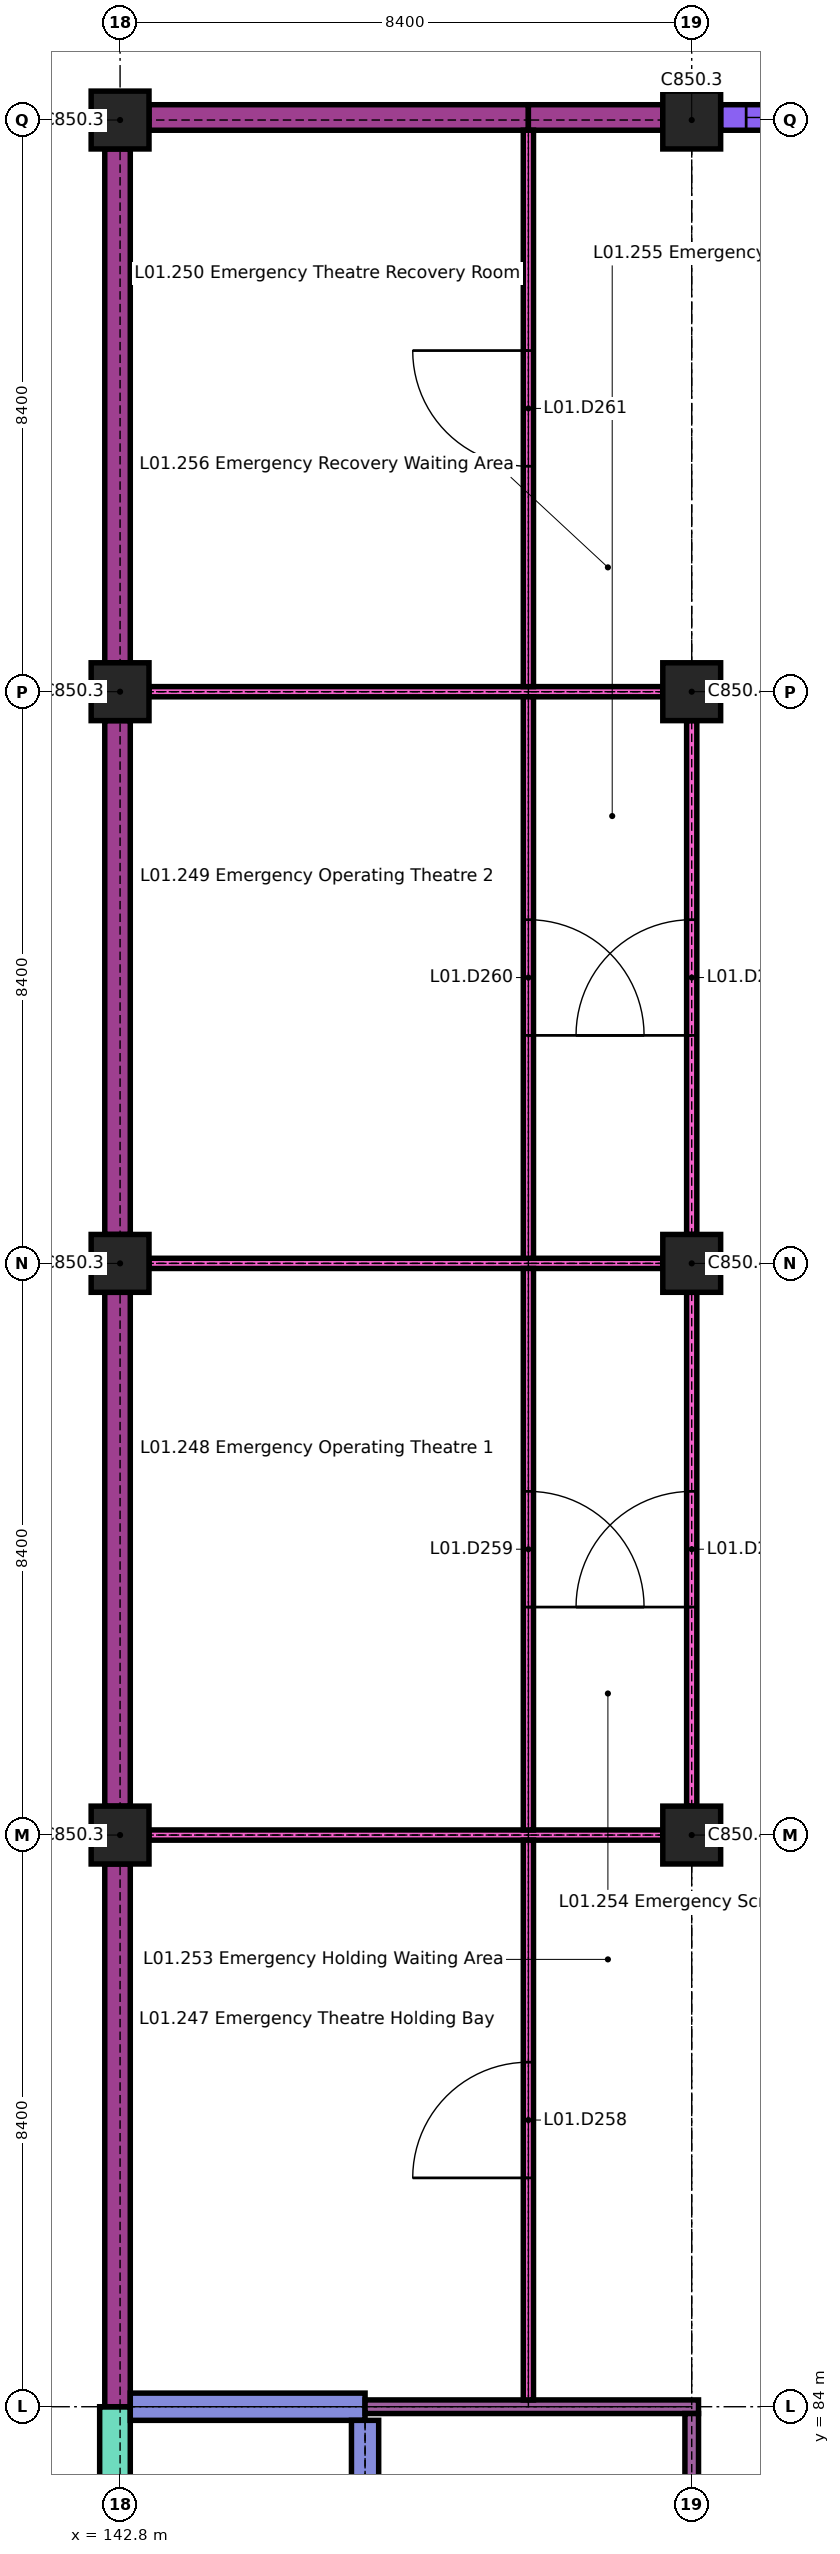
"""IFC4 building model, lengths in metres.
Left out: names, types, materials, properties, quantities, classifications, styles, units other than length and angle.
Written with IfcOpenShell. Run it as: python <this file> out.ifc"""

import sys

from ifc_helpers import new_model, si_unit, direction, frame, frame_2d, origin, origin_2d, place, context, subcontext, project, spatial, rectangle, extrude, element, fill, save


model = new_model("IFC4")
c1 = context("Model", 3, precision=1e-05, world=origin(), true_north=direction((0.0, 1.0)))
c2 = subcontext(c1, "Body", "Model", "MODEL_VIEW")
j1 = project(units=[si_unit("LENGTHUNIT", "METRE"), si_unit("PLANEANGLEUNIT", "RADIAN")], contexts=[c1])
p1 = place(None, origin())
s1 = spatial("IfcSite", under=j1, at=p1, CompositionType="ELEMENT")
p2 = place(p1, origin())
s2 = spatial("IfcBuilding", under=s1, at=p2, CompositionType="ELEMENT")
p3 = place(p2, frame((0.0, 0.0, 4.5)))
s3 = spatial("IfcBuildingStorey", under=s2, at=p3, CompositionType="ELEMENT", Elevation=4.5)
for number, where, z_axis, x_axis in (
    (1, (142.8, 92.4, 0.0), (0.0, 0.0, 1.0), (1.0, 0.0, 0.0)),
    (2, (151.2, 92.4, 0.0), (0.0, 0.0, 1.0), (1.0, 0.0, 0.0)),
    (3, (142.8, 100.8, 0.0), (0.0, 0.0, 1.0), (1.0, 0.0, 0.0)),
    (4, (151.2, 100.8, 0.0), (0.0, 0.0, 1.0), (1.0, 0.0, 0.0)),
    (5, (142.8, 109.2, 0.0), (0.0, 0.0, 1.0), (1.0, 0.0, 0.0)),
    (6, (151.2, 109.2, 0.0), (0.0, 0.0, 1.0), (1.0, 0.0, 0.0)),
    (7, (142.8, 117.6, 0.0), (0.0, 0.0, 1.0), (1.0, 0.0, 0.0)),
    (8, (151.2, 117.6, 0.0), (0.0, 0.0, 1.0), (1.0, 0.0, 0.0)),
):
    element("IfcColumn", number, at=place(p3, frame(where, z_axis=z_axis, x_axis=x_axis)), inside=s3, PredefinedType="COLUMN", context=c2, shape_type="SweptSolid", body=[
        extrude(rectangle(XDim=0.85, YDim=0.85, at=origin_2d()), origin(), (0.0, 0.0, 1.0), 3.45),
    ])
p4 = place(p3, frame((143.225, 117.637, 0.0), z_axis=(0.0, 0.0, 1.0), x_axis=(1.0, 0.0, 0.0)))
e9 = element("IfcWall", 9, at=p4, inside=s3, PredefinedType="SOLIDWALL", context=c2, shape_type="SweptSolid", body=[
    extrude(rectangle(XDim=5.575, YDim=0.375, at=frame_2d((2.788, 0.0))), origin(), (0.0, 0.0, 1.0), 3.15),
])
p5 = place(p3, frame((148.8, 117.637, 0.0), z_axis=(0.0, 0.0, 1.0), x_axis=(1.0, 0.0, 0.0)))
e10 = element("IfcWall", 10, at=p5, inside=s3, PredefinedType="SOLIDWALL", context=c2, shape_type="SweptSolid", body=[
    extrude(rectangle(XDim=1.975, YDim=0.375, at=frame_2d((0.987, 0.0))), origin(), (0.0, 0.0, 1.0), 3.15),
])
p6 = place(p3, frame((151.625, 117.637, 0.0), z_axis=(0.0, 0.0, 1.0), x_axis=(1.0, 0.0, 0.0)))
e11 = element("IfcWall", 11, at=p6, inside=s3, PredefinedType="SOLIDWALL", context=c2, shape_type="SweptSolid", body=[
    extrude(rectangle(XDim=2.175, YDim=0.375, at=frame_2d((1.087, 0.0))), origin(), (0.0, 0.0, 1.0), 3.6),
])
p7 = place(p6, frame((0.375, 0.0, 0.9)))
e12 = element("IfcOpeningElement", 12, at=p7, cuts=e11, PredefinedType="OPENING", context=c2, shape_type="SweptSolid", body=[
    extrude(rectangle(XDim=1.2, YDim=1.5, at=frame_2d((0.6, 0.75))), frame((0.0, 0.198, 0.0), z_axis=(0.0, -1.0, 0.0), x_axis=(1.0, 0.0, 0.0)), (0.0, 0.0, 1.0), 0.395),
])
p8 = place(p3, frame((142.725, 79.8, 0.0), z_axis=(0.0, 0.0, 1.0), x_axis=(0.0, 1.0, 0.0)))
e13 = element("IfcWall", 13, at=p8, inside=s3, PredefinedType="SOLIDWALL", context=c2, shape_type="SweptSolid", body=[
    extrude(rectangle(XDim=4.2, YDim=0.45, at=frame_2d((2.1, 0.0))), origin(), (0.0, 0.0, 1.0), 3.45),
])
p9 = place(p3, frame((142.762, 84.0, 0.0), z_axis=(0.0, 0.0, 1.0), x_axis=(0.0, 1.0, 0.0)))
e14 = element("IfcWall", 14, at=p9, inside=s3, PredefinedType="SOLIDWALL", context=c2, shape_type="SweptSolid", body=[
    extrude(rectangle(XDim=7.975, YDim=0.375, at=frame_2d((3.988, 0.0))), origin(), (0.0, 0.0, 1.0), 3.15),
])
p10 = place(p3, frame((142.762, 92.825, 0.0), z_axis=(0.0, 0.0, 1.0), x_axis=(0.0, 1.0, 0.0)))
e15 = element("IfcWall", 15, at=p10, inside=s3, PredefinedType="SOLIDWALL", context=c2, shape_type="SweptSolid", body=[
    extrude(rectangle(XDim=7.55, YDim=0.375, at=frame_2d((3.775, 0.0))), origin(), (0.0, 0.0, 1.0), 3.15),
])
p11 = place(p3, frame((142.762, 101.225, 0.0), z_axis=(0.0, 0.0, 1.0), x_axis=(0.0, 1.0, 0.0)))
e16 = element("IfcWall", 16, at=p11, inside=s3, PredefinedType="SOLIDWALL", context=c2, shape_type="SweptSolid", body=[
    extrude(rectangle(XDim=7.55, YDim=0.375, at=frame_2d((3.775, 0.0))), origin(), (0.0, 0.0, 1.0), 3.15),
])
p12 = place(p3, frame((142.762, 109.625, 0.0), z_axis=(0.0, 0.0, 1.0), x_axis=(0.0, 1.0, 0.0)))
e17 = element("IfcWall", 17, at=p12, inside=s3, PredefinedType="SOLIDWALL", context=c2, shape_type="SweptSolid", body=[
    extrude(rectangle(XDim=7.55, YDim=0.375, at=frame_2d((3.775, 0.0))), origin(), (0.0, 0.0, 1.0), 3.15),
])
p13 = place(p3, frame((142.95, 84.0, 0.0), z_axis=(0.0, 0.0, 1.0), x_axis=(1.0, 0.0, 0.0)))
e18 = element("IfcWall", 18, at=p13, inside=s3, PredefinedType="SHEAR", context=c2, shape_type="SweptSolid", body=[
    extrude(rectangle(XDim=3.45, YDim=0.4, at=frame_2d((1.725, 0.0))), origin(), (0.0, 0.0, 1.0), 3.45),
])
p14 = place(p3, frame((146.4, 84.0, 0.0), z_axis=(0.0, 0.0, 1.0), x_axis=(1.0, 0.0, 0.0)))
e19 = element("IfcWall", 19, at=p14, inside=s3, PredefinedType="PARTITIONING", context=c2, shape_type="SweptSolid", body=[
    extrude(rectangle(XDim=4.9, YDim=0.2, at=frame_2d((2.45, 0.0))), origin(), (0.0, 0.0, 1.0), 3.45),
])
for number, where, z_axis, x_axis in (
    (20, (143.225, 92.4, 0.0), (0.0, 0.0, 1.0), (1.0, 0.0, 0.0)),
    (21, (143.225, 100.8, 0.0), (0.0, 0.0, 1.0), (1.0, 0.0, 0.0)),
    (22, (143.225, 109.2, 0.0), (0.0, 0.0, 1.0), (1.0, 0.0, 0.0)),
):
    element("IfcWall", number, at=place(p3, frame(where, z_axis=z_axis, x_axis=x_axis)), inside=s3, PredefinedType="PARTITIONING", context=c2, shape_type="SweptSolid", body=[
        extrude(rectangle(XDim=7.55, YDim=0.15, at=frame_2d((3.775, 0.0))), origin(), (0.0, 0.0, 1.0), 3.6),
    ])
p15 = place(p3, frame((146.4, 75.8, 0.0), z_axis=(0.0, 0.0, 1.0), x_axis=(0.0, 1.0, 0.0)))
e23 = element("IfcWall", 23, at=p15, inside=s3, PredefinedType="SHEAR", context=c2, shape_type="SweptSolid", body=[
    extrude(rectangle(XDim=8.0, YDim=0.4, at=frame_2d((4.0, 0.0))), origin(), (0.0, 0.0, 1.0), 3.45),
])
p16 = place(p15, frame((1.3, 0.0, 0.0)))
e24 = element("IfcOpeningElement", 24, at=p16, cuts=e23, PredefinedType="OPENING", context=c2, shape_type="SweptSolid", body=[
    extrude(rectangle(XDim=1.4, YDim=2.1, at=frame_2d((0.7, 1.05))), frame((0.0, 0.21, 0.0), z_axis=(0.0, -1.0, 0.0), x_axis=(1.0, 0.0, 0.0)), (0.0, 0.0, 1.0), 0.42),
])
p17 = place(p15, frame((5.45, 0.0, 0.0)))
e25 = element("IfcOpeningElement", 25, at=p17, cuts=e23, PredefinedType="OPENING", context=c2, shape_type="SweptSolid", body=[
    extrude(rectangle(XDim=1.1, YDim=2.1, at=frame_2d((0.55, 1.05))), frame((0.0, 0.21, 0.0), z_axis=(0.0, -1.0, 0.0), x_axis=(1.0, 0.0, 0.0)), (0.0, 0.0, 1.0), 0.42),
])
p18 = place(p3, frame((148.8, 84.1, 0.0), z_axis=(0.0, 0.0, 1.0), x_axis=(0.0, 1.0, 0.0)))
e26 = element("IfcWall", 26, at=p18, inside=s3, PredefinedType="PARTITIONING", context=c2, shape_type="SweptSolid", body=[
    extrude(rectangle(XDim=8.225, YDim=0.15, at=frame_2d((4.112, 0.0))), origin(), (0.0, 0.0, 1.0), 3.6),
])
p19 = place(p18, frame((3.262, 0.0, 0.0)))
e27 = element("IfcOpeningElement", 27, at=p19, cuts=e26, PredefinedType="OPENING", context=c2, shape_type="SweptSolid", body=[
    extrude(rectangle(XDim=1.7, YDim=2.4, at=frame_2d((0.85, 1.2))), frame((0.0, 0.085, 0.0), z_axis=(0.0, -1.0, 0.0), x_axis=(1.0, 0.0, 0.0)), (0.0, 0.0, 1.0), 0.17),
])
p20 = place(p3, frame((148.8, 92.475, 0.0), z_axis=(0.0, 0.0, 1.0), x_axis=(0.0, 1.0, 0.0)))
e28 = element("IfcWall", 28, at=p20, inside=s3, PredefinedType="PARTITIONING", context=c2, shape_type="SweptSolid", body=[
    extrude(rectangle(XDim=8.25, YDim=0.15, at=frame_2d((4.125, 0.0))), origin(), (0.0, 0.0, 1.0), 3.6),
])
p21 = place(p20, frame((3.275, 0.0, 0.0)))
e29 = element("IfcOpeningElement", 29, at=p21, cuts=e28, PredefinedType="OPENING", context=c2, shape_type="SweptSolid", body=[
    extrude(rectangle(XDim=1.7, YDim=2.4, at=frame_2d((0.85, 1.2))), frame((0.0, 0.085, 0.0), z_axis=(0.0, -1.0, 0.0), x_axis=(1.0, 0.0, 0.0)), (0.0, 0.0, 1.0), 0.17),
])
p22 = place(p3, frame((148.8, 100.875, 0.0), z_axis=(0.0, 0.0, 1.0), x_axis=(0.0, 1.0, 0.0)))
e30 = element("IfcWall", 30, at=p22, inside=s3, PredefinedType="PARTITIONING", context=c2, shape_type="SweptSolid", body=[
    extrude(rectangle(XDim=8.25, YDim=0.15, at=frame_2d((4.125, 0.0))), origin(), (0.0, 0.0, 1.0), 3.6),
])
p23 = place(p22, frame((3.275, 0.0, 0.0)))
e31 = element("IfcOpeningElement", 31, at=p23, cuts=e30, PredefinedType="OPENING", context=c2, shape_type="SweptSolid", body=[
    extrude(rectangle(XDim=1.7, YDim=2.4, at=frame_2d((0.85, 1.2))), frame((0.0, 0.085, 0.0), z_axis=(0.0, -1.0, 0.0), x_axis=(1.0, 0.0, 0.0)), (0.0, 0.0, 1.0), 0.17),
])
p24 = place(p3, frame((148.8, 109.275, 0.0), z_axis=(0.0, 0.0, 1.0), x_axis=(0.0, 1.0, 0.0)))
e32 = element("IfcWall", 32, at=p24, inside=s3, PredefinedType="PARTITIONING", context=c2, shape_type="SweptSolid", body=[
    extrude(rectangle(XDim=8.175, YDim=0.15, at=frame_2d((4.087, 0.0))), origin(), (0.0, 0.0, 1.0), 3.6),
])
p25 = place(p24, frame((3.238, 0.0, 0.0)))
e33 = element("IfcOpeningElement", 33, at=p25, cuts=e32, PredefinedType="OPENING", context=c2, shape_type="SweptSolid", body=[
    extrude(rectangle(XDim=1.7, YDim=2.4, at=frame_2d((0.85, 1.2))), frame((0.0, 0.085, 0.0), z_axis=(0.0, -1.0, 0.0), x_axis=(1.0, 0.0, 0.0)), (0.0, 0.0, 1.0), 0.17),
])
p26 = place(p3, frame((151.2, 75.7, 0.0), z_axis=(0.0, 0.0, 1.0), x_axis=(0.0, 1.0, 0.0)))
e34 = element("IfcWall", 34, at=p26, inside=s3, PredefinedType="PARTITIONING", context=c2, shape_type="SweptSolid", body=[
    extrude(rectangle(XDim=8.2, YDim=0.2, at=frame_2d((4.1, 0.0))), origin(), (0.0, 0.0, 1.0), 3.45),
])
p27 = place(p26, frame((3.2, 0.0, 0.0)))
e35 = element("IfcOpeningElement", 35, at=p27, cuts=e34, PredefinedType="OPENING", context=c2, shape_type="SweptSolid", body=[
    extrude(rectangle(XDim=1.8, YDim=2.4, at=frame_2d((0.9, 1.2))), frame((0.0, 0.11, 0.0), z_axis=(0.0, -1.0, 0.0), x_axis=(1.0, 0.0, 0.0)), (0.0, 0.0, 1.0), 0.22),
])
p28 = place(p3, frame((151.2, 92.825, 0.0), z_axis=(0.0, 0.0, 1.0), x_axis=(0.0, 1.0, 0.0)))
e36 = element("IfcWall", 36, at=p28, inside=s3, PredefinedType="PARTITIONING", context=c2, shape_type="SweptSolid", body=[
    extrude(rectangle(XDim=7.55, YDim=0.15, at=frame_2d((3.775, 0.0))), origin(), (0.0, 0.0, 1.0), 3.6),
])
p29 = place(p28, frame((2.925, 0.0, 0.0)))
e37 = element("IfcOpeningElement", 37, at=p29, cuts=e36, PredefinedType="OPENING", context=c2, shape_type="SweptSolid", body=[
    extrude(rectangle(XDim=1.7, YDim=2.4, at=frame_2d((0.85, 1.2))), frame((0.0, 0.085, 0.0), z_axis=(0.0, -1.0, 0.0), x_axis=(1.0, 0.0, 0.0)), (0.0, 0.0, 1.0), 0.17),
])
p30 = place(p3, frame((151.2, 101.225, 0.0), z_axis=(0.0, 0.0, 1.0), x_axis=(0.0, 1.0, 0.0)))
e38 = element("IfcWall", 38, at=p30, inside=s3, PredefinedType="PARTITIONING", context=c2, shape_type="SweptSolid", body=[
    extrude(rectangle(XDim=7.55, YDim=0.15, at=frame_2d((3.775, 0.0))), origin(), (0.0, 0.0, 1.0), 3.6),
])
p31 = place(p30, frame((2.925, 0.0, 0.0)))
e39 = element("IfcOpeningElement", 39, at=p31, cuts=e38, PredefinedType="OPENING", context=c2, shape_type="SweptSolid", body=[
    extrude(rectangle(XDim=1.7, YDim=2.4, at=frame_2d((0.85, 1.2))), frame((0.0, 0.085, 0.0), z_axis=(0.0, -1.0, 0.0), x_axis=(1.0, 0.0, 0.0)), (0.0, 0.0, 1.0), 0.17),
])
p32 = place(p7, origin())
e40 = element("IfcWindow", 40, at=p32, inside=s3, PartitioningType="SINGLE_PANEL", PredefinedType="WINDOW", context=c2, shape_type="SweptSolid", body=[
    extrude(rectangle(XDim=1.2, YDim=1.5, at=frame_2d((0.6, 0.75))), frame((0.0, 0.03, 0.0), z_axis=(0.0, -1.0, 0.0), x_axis=(1.0, 0.0, 0.0)), (0.0, 0.0, 1.0), 0.06),
])
fill(e12, e40)
p33 = place(p19, origin())
e41 = element("IfcDoor", 41, at=p33, inside=s3, OperationType="SINGLE_SWING_RIGHT", PredefinedType="DOOR", context=c2, shape_type="SweptSolid", body=[
    extrude(rectangle(XDim=1.7, YDim=2.4, at=frame_2d((0.85, 1.2))), frame((0.0, 0.025, 0.0), z_axis=(0.0, -1.0, 0.0), x_axis=(1.0, 0.0, 0.0)), (0.0, 0.0, 1.0), 0.05),
])
fill(e27, e41)
p34 = place(p21, origin())
e42 = element("IfcDoor", 42, at=p34, inside=s3, OperationType="SINGLE_SWING_LEFT", PredefinedType="DOOR", context=c2, shape_type="SweptSolid", body=[
    extrude(rectangle(XDim=1.7, YDim=2.4, at=frame_2d((0.85, 1.2))), frame((0.0, 0.025, 0.0), z_axis=(0.0, -1.0, 0.0), x_axis=(1.0, 0.0, 0.0)), (0.0, 0.0, 1.0), 0.05),
])
fill(e29, e42)
p35 = place(p23, origin())
e43 = element("IfcDoor", 43, at=p35, inside=s3, OperationType="SINGLE_SWING_LEFT", PredefinedType="DOOR", context=c2, shape_type="SweptSolid", body=[
    extrude(rectangle(XDim=1.7, YDim=2.4, at=frame_2d((0.85, 1.2))), frame((0.0, 0.025, 0.0), z_axis=(0.0, -1.0, 0.0), x_axis=(1.0, 0.0, 0.0)), (0.0, 0.0, 1.0), 0.05),
])
fill(e31, e43)
p36 = place(p25, origin())
e44 = element("IfcDoor", 44, at=p36, inside=s3, OperationType="SINGLE_SWING_LEFT", PredefinedType="DOOR", context=c2, shape_type="SweptSolid", body=[
    extrude(rectangle(XDim=1.7, YDim=2.4, at=frame_2d((0.85, 1.2))), frame((0.0, 0.025, 0.0), z_axis=(0.0, -1.0, 0.0), x_axis=(1.0, 0.0, 0.0)), (0.0, 0.0, 1.0), 0.05),
])
fill(e33, e44)
p37 = place(p29, origin())
e45 = element("IfcDoor", 45, at=p37, inside=s3, OperationType="SINGLE_SWING_RIGHT", PredefinedType="DOOR", context=c2, shape_type="SweptSolid", body=[
    extrude(rectangle(XDim=1.7, YDim=2.4, at=frame_2d((0.85, 1.2))), frame((0.0, 0.025, 0.0), z_axis=(0.0, -1.0, 0.0), x_axis=(1.0, 0.0, 0.0)), (0.0, 0.0, 1.0), 0.05),
])
fill(e37, e45)
p38 = place(p31, origin())
e46 = element("IfcDoor", 46, at=p38, inside=s3, OperationType="SINGLE_SWING_RIGHT", PredefinedType="DOOR", context=c2, shape_type="SweptSolid", body=[
    extrude(rectangle(XDim=1.7, YDim=2.4, at=frame_2d((0.85, 1.2))), frame((0.0, 0.025, 0.0), z_axis=(0.0, -1.0, 0.0), x_axis=(1.0, 0.0, 0.0)), (0.0, 0.0, 1.0), 0.05),
])
fill(e39, e46)
save(model, sys.argv[1])
